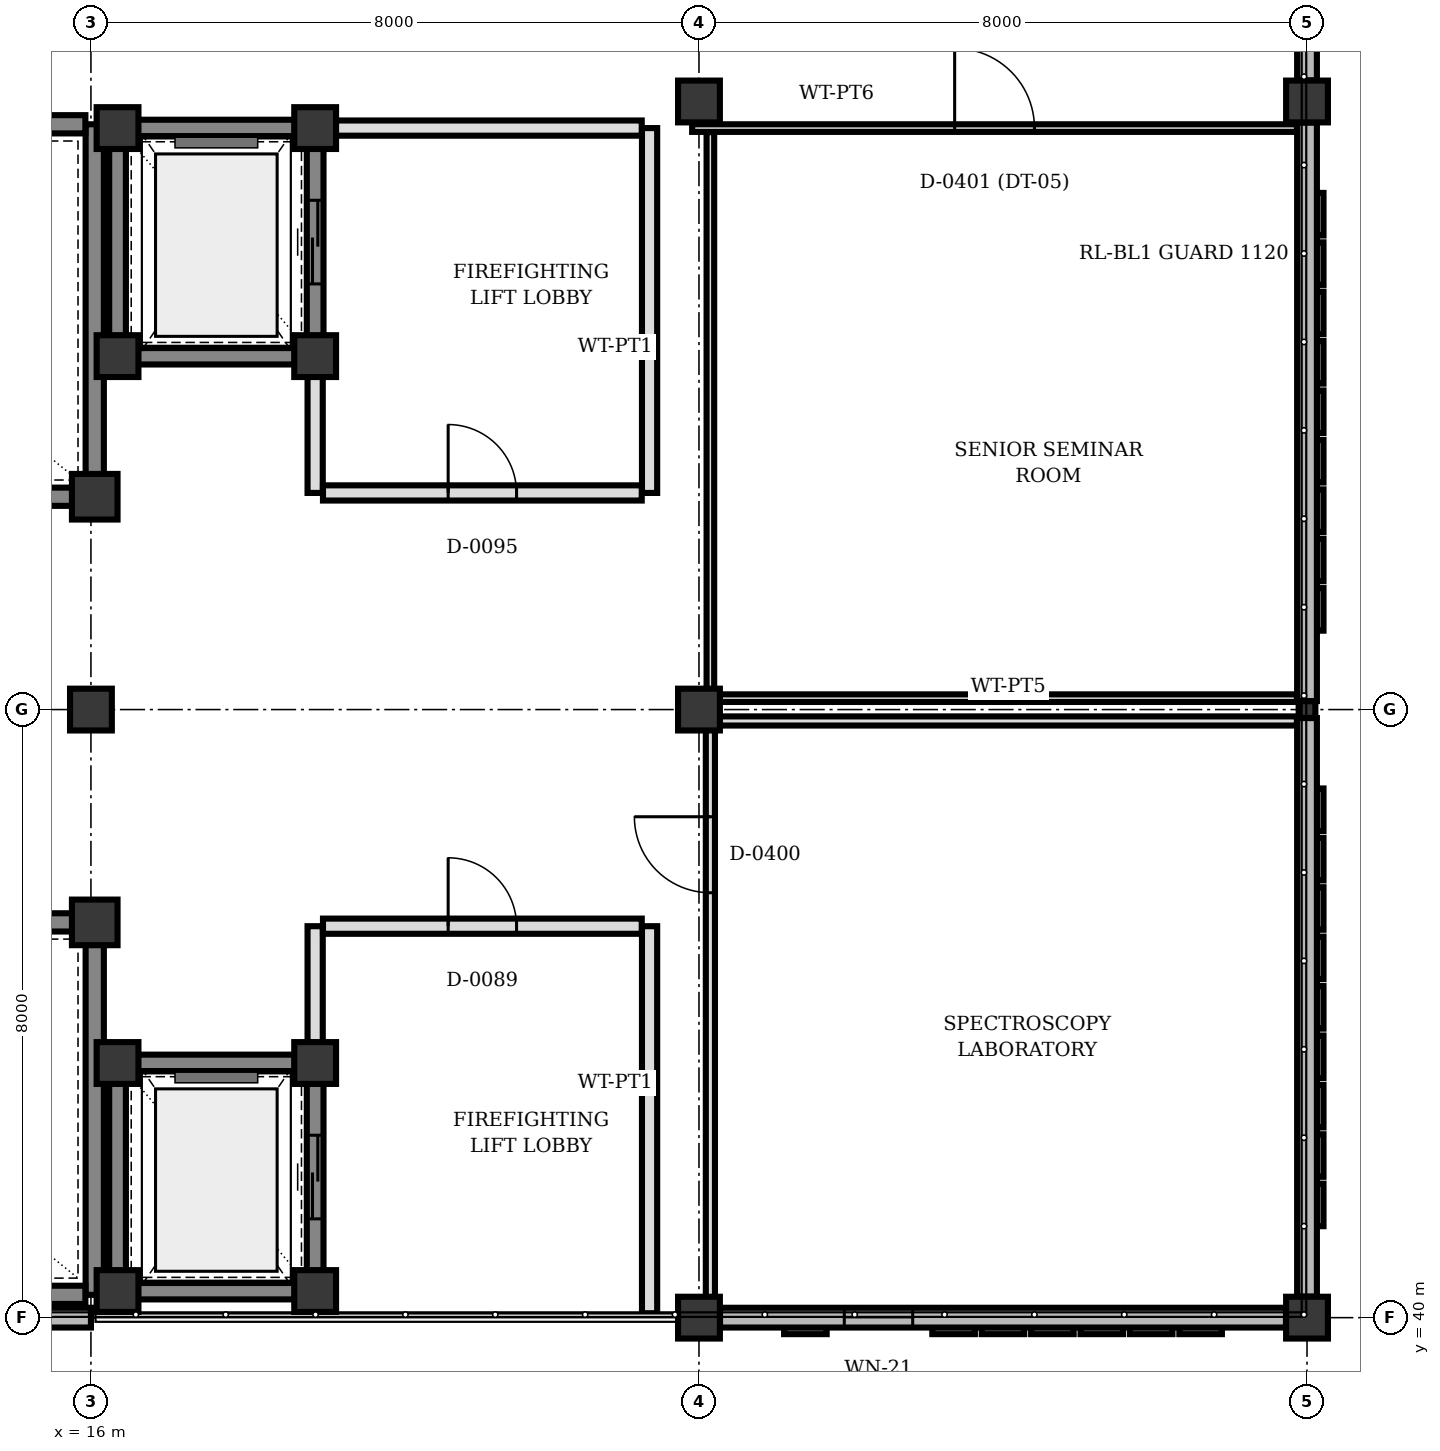
"""IFC4 building model, lengths in metres.
Left out: names, types, materials, properties, quantities, classifications, styles, units other than length and angle.
Written with IfcOpenShell. Run it as: python <this file> out.ifc"""

import sys

from ifc_helpers import new_model, si_unit, direction, frame, frame_2d, origin, origin_2d, place, context, subcontext, project, spatial, rectangle, hollow_rectangle, extrude, element, fill, save


model = new_model("IFC4")
c1 = context("Model", 3, precision=1e-05, world=origin(), true_north=direction((0.0, 1.0)))
c2 = subcontext(c1, "Body", "Model", "MODEL_VIEW")
j1 = project(units=[si_unit("LENGTHUNIT", "METRE"), si_unit("PLANEANGLEUNIT", "RADIAN")], contexts=[c1])
p1 = place(None, origin())
s1 = spatial("IfcSite", under=j1, at=p1, CompositionType="ELEMENT")
p2 = place(p1, origin())
s2 = spatial("IfcBuilding", under=s1, at=p2, CompositionType="ELEMENT")
p3 = place(p2, frame((0.0, 0.0, 16.5)))
s3 = spatial("IfcBuildingStorey", under=s2, at=p3, CompositionType="ELEMENT", Elevation=16.5)
for number, where, z_axis, x_axis in (
    (1, (16.05, 45.2, 0.0), (0.0, 0.0, 1.0), (1.0, 0.0, 0.0)),
    (2, (16.05, 50.8, 0.0), (0.0, 0.0, 1.0), (1.0, 0.0, 0.0)),
):
    element("IfcColumn", number, at=place(p3, frame(where, z_axis=z_axis, x_axis=x_axis)), inside=s3, PredefinedType="COLUMN", context=c2, shape_type="SweptSolid", body=[
        extrude(rectangle(XDim=0.6, YDim=0.6, at=origin_2d()), origin(), (0.0, 0.0, 1.0), 4.0),
    ])
for number, where, z_axis, x_axis in (
    (3, (16.35, 40.35, 0.0), (0.0, 0.0, 1.0), (1.0, 0.0, 0.0)),
    (4, (18.95, 40.35, 0.0), (0.0, 0.0, 1.0), (1.0, 0.0, 0.0)),
    (5, (18.95, 43.35, 0.0), (0.0, 0.0, 1.0), (1.0, 0.0, 0.0)),
    (6, (16.35, 43.35, 0.0), (0.0, 0.0, 1.0), (1.0, 0.0, 0.0)),
    (7, (16.35, 52.65, 0.0), (0.0, 0.0, 1.0), (1.0, 0.0, 0.0)),
    (8, (18.95, 52.65, 0.0), (0.0, 0.0, 1.0), (1.0, 0.0, 0.0)),
    (9, (18.95, 55.65, 0.0), (0.0, 0.0, 1.0), (1.0, 0.0, 0.0)),
    (10, (16.35, 55.65, 0.0), (0.0, 0.0, 1.0), (1.0, 0.0, 0.0)),
    (11, (16.0, 48.0, 0.0), (0.0, 0.0, 1.0), (1.0, 0.0, 0.0)),
    (12, (24.0, 40.0, 0.0), (0.0, 0.0, 1.0), (1.0, 0.0, 0.0)),
    (13, (24.0, 48.0, 0.0), (0.0, 0.0, 1.0), (1.0, 0.0, 0.0)),
    (14, (24.0, 56.0, 0.0), (0.0, 0.0, 1.0), (1.0, 0.0, 0.0)),
    (15, (32.0, 40.0, 0.0), (0.0, 0.0, 1.0), (1.0, 0.0, 0.0)),
):
    element("IfcColumn", number, at=place(p3, frame(where, z_axis=z_axis, x_axis=x_axis)), inside=s3, PredefinedType="COLUMN", context=c2, shape_type="SweptSolid", body=[
        extrude(rectangle(XDim=0.55, YDim=0.55, at=origin_2d()), origin(), (0.0, 0.0, 1.0), 4.0),
    ])
p4 = place(p3, frame((32.0, 48.0, 0.0), z_axis=(0.0, 0.0, 1.0), x_axis=(1.0, 0.0, 0.0)))
e16 = element("IfcColumn", 16, at=p4, inside=s3, PredefinedType="COLUMN", context=c2, shape_type="SweptSolid", body=[
    extrude(hollow_rectangle(XDim=0.22, YDim=0.22, WallThickness=0.01, at=origin_2d()), origin(), (0.0, 0.0, 1.0), 4.0),
])
p5 = place(p3, frame((32.0, 56.0, 0.0), z_axis=(0.0, 0.0, 1.0), x_axis=(1.0, 0.0, 0.0)))
e17 = element("IfcColumn", 17, at=p5, inside=s3, PredefinedType="COLUMN", context=c2, shape_type="SweptSolid", body=[
    extrude(rectangle(XDim=0.55, YDim=0.55, at=origin_2d()), origin(), (0.0, 0.0, 1.0), 4.0),
])
p6 = place(p3, frame((32.0, 61.888, 0.0), z_axis=(0.0, 0.0, 1.0), x_axis=(0.0, -1.0, 0.0)))
e18 = element("IfcWall", 18, at=p6, inside=s3, PredefinedType="SOLIDWALL", context=c2, shape_type="SweptSolid", body=[
    extrude(rectangle(XDim=5.611, YDim=0.26, at=frame_2d((2.805, 0.0))), origin(), (0.0, 0.0, 1.0), 3.068),
])
for number, where, z_axis, x_axis in (
    (19, (32.0, 55.723, 0.0), (0.0, 0.0, 1.0), (0.0, -1.0, 0.0)),
    (20, (32.0, 47.888, 0.0), (0.0, 0.0, 1.0), (0.0, -1.0, 0.0)),
):
    element("IfcWall", number, at=place(p3, frame(where, z_axis=z_axis, x_axis=x_axis)), inside=s3, PredefinedType="SOLIDWALL", context=c2, shape_type="SweptSolid", body=[
        extrude(rectangle(XDim=7.611, YDim=0.26, at=frame_2d((3.805, 0.0))), origin(), (0.0, 0.0, 1.0), 3.149),
    ])
p7 = place(p3, frame((31.723, 40.0, 0.0), z_axis=(0.0, 0.0, 1.0), x_axis=(-1.0, 0.0, 0.0)))
e21 = element("IfcWall", 21, at=p7, inside=s3, PredefinedType="SOLIDWALL", context=c2, shape_type="SweptSolid", body=[
    extrude(rectangle(XDim=7.446, YDim=0.26, at=frame_2d((3.723, 0.0))), origin(), (0.0, 0.0, 1.0), 3.068),
])
p8 = place(p7, frame((4.911, 0.0, 0.9)))
e22 = element("IfcOpeningElement", 22, at=p8, cuts=e21, PredefinedType="OPENING", context=c2, shape_type="SweptSolid", body=[
    extrude(rectangle(XDim=0.9, YDim=1.4, at=frame_2d((0.45, 0.7))), frame((0.0, 0.14, 0.0), z_axis=(0.0, -1.0, 0.0), x_axis=(1.0, 0.0, 0.0)), (0.0, 0.0, 1.0), 0.28),
])
p9 = place(p3, frame((16.0, 40.0, 0.0), z_axis=(0.0, 0.0, 1.0), x_axis=(-1.0, 0.0, 0.0)))
e23 = element("IfcWall", 23, at=p9, inside=s3, PredefinedType="SOLIDWALL", context=c2, shape_type="SweptSolid", body=[
    extrude(rectangle(XDim=7.448, YDim=0.26, at=frame_2d((3.724, 0.0))), origin(), (0.0, 0.0, 1.0), 3.55),
])
p10 = place(p3, frame((16.05, 44.908, 0.0), z_axis=(0.0, 0.0, 1.0), x_axis=(0.0, -1.0, 0.0)))
e24 = element("IfcWall", 24, at=p10, inside=s3, PredefinedType="SHEAR", context=c2, shape_type="SweptSolid", body=[
    extrude(rectangle(XDim=4.608, YDim=0.24, at=frame_2d((2.304, 0.0))), origin(), (0.0, 0.0, 1.0), 3.74),
])
p11 = place(p3, frame((15.927, 40.3, 0.0), z_axis=(0.0, 0.0, 1.0), x_axis=(-1.0, 0.0, 0.0)))
e25 = element("IfcWall", 25, at=p11, inside=s3, PredefinedType="SHEAR", context=c2, shape_type="SweptSolid", body=[
    extrude(rectangle(XDim=7.385, YDim=0.24, at=frame_2d((3.692, 0.0))), origin(), (0.0, 0.0, 1.0), 3.74),
])
p12 = place(p3, frame((15.758, 45.2, 0.0), z_axis=(0.0, 0.0, 1.0), x_axis=(-1.0, 0.0, 0.0)))
e26 = element("IfcWall", 26, at=p12, inside=s3, PredefinedType="SHEAR", context=c2, shape_type="SweptSolid", body=[
    extrude(rectangle(XDim=7.216, YDim=0.24, at=frame_2d((3.608, 0.0))), origin(), (0.0, 0.0, 1.0), 3.74),
])
p13 = place(p12, frame((5.694, 0.0, 0.0)))
e27 = element("IfcOpeningElement", 27, at=p13, cuts=e26, PredefinedType="OPENING", context=c2, shape_type="SweptSolid", body=[
    extrude(rectangle(XDim=0.88, YDim=2.1, at=frame_2d((0.44, 1.05))), frame((0.0, 0.13, 0.0), z_axis=(0.0, -1.0, 0.0), x_axis=(1.0, 0.0, 0.0)), (0.0, 0.0, 1.0), 0.26),
])
p14 = place(p3, frame((16.05, 55.7, 0.0), z_axis=(0.0, 0.0, 1.0), x_axis=(0.0, -1.0, 0.0)))
e28 = element("IfcWall", 28, at=p14, inside=s3, PredefinedType="SHEAR", context=c2, shape_type="SweptSolid", body=[
    extrude(rectangle(XDim=4.608, YDim=0.24, at=frame_2d((2.304, 0.0))), origin(), (0.0, 0.0, 1.0), 3.74),
])
p15 = place(p3, frame((15.758, 50.8, 0.0), z_axis=(0.0, 0.0, 1.0), x_axis=(-1.0, 0.0, 0.0)))
e29 = element("IfcWall", 29, at=p15, inside=s3, PredefinedType="SHEAR", context=c2, shape_type="SweptSolid", body=[
    extrude(rectangle(XDim=7.216, YDim=0.24, at=frame_2d((3.608, 0.0))), origin(), (0.0, 0.0, 1.0), 3.74),
])
p16 = place(p15, frame((5.694, 0.0, 0.0)))
e30 = element("IfcOpeningElement", 30, at=p16, cuts=e29, PredefinedType="OPENING", context=c2, shape_type="SweptSolid", body=[
    extrude(rectangle(XDim=0.88, YDim=2.1, at=frame_2d((0.44, 1.05))), frame((0.0, 0.13, 0.0), z_axis=(0.0, -1.0, 0.0), x_axis=(1.0, 0.0, 0.0)), (0.0, 0.0, 1.0), 0.26),
])
p17 = place(p3, frame((15.927, 55.7, 0.0), z_axis=(0.0, 0.0, 1.0), x_axis=(-1.0, 0.0, 0.0)))
e31 = element("IfcWall", 31, at=p17, inside=s3, PredefinedType="SHEAR", context=c2, shape_type="SweptSolid", body=[
    extrude(rectangle(XDim=7.385, YDim=0.24, at=frame_2d((3.692, 0.0))), origin(), (0.0, 0.0, 1.0), 3.74),
])
p18 = place(p3, frame((16.617, 40.35, 0.0), z_axis=(0.0, 0.0, 1.0), x_axis=(1.0, 0.0, 0.0)))
e32 = element("IfcWall", 32, at=p18, inside=s3, PredefinedType="SHEAR", context=c2, shape_type="SweptSolid", body=[
    extrude(rectangle(XDim=2.066, YDim=0.22, at=frame_2d((1.033, 0.0))), origin(), (0.0, 0.0, 1.0), 3.74),
])
p19 = place(p3, frame((18.95, 40.617, 0.0), z_axis=(0.0, 0.0, 1.0), x_axis=(0.0, 1.0, 0.0)))
e33 = element("IfcWall", 33, at=p19, inside=s3, PredefinedType="SHEAR", context=c2, shape_type="SweptSolid", body=[
    extrude(rectangle(XDim=2.466, YDim=0.22, at=frame_2d((1.233, 0.0))), origin(), (0.0, 0.0, 1.0), 3.74),
])
p20 = place(p19, frame((0.683, 0.0, 0.0)))
e34 = element("IfcOpeningElement", 34, at=p20, cuts=e33, PredefinedType="OPENING", context=c2, shape_type="SweptSolid", body=[
    extrude(rectangle(XDim=1.1, YDim=2.15, at=frame_2d((0.55, 1.075))), frame((0.0, 0.12, 0.0), z_axis=(0.0, -1.0, 0.0), x_axis=(1.0, 0.0, 0.0)), (0.0, 0.0, 1.0), 0.24),
])
p21 = place(p3, frame((18.683, 43.35, 0.0), z_axis=(0.0, 0.0, 1.0), x_axis=(-1.0, 0.0, 0.0)))
e35 = element("IfcWall", 35, at=p21, inside=s3, PredefinedType="SHEAR", context=c2, shape_type="SweptSolid", body=[
    extrude(rectangle(XDim=2.066, YDim=0.22, at=frame_2d((1.033, 0.0))), origin(), (0.0, 0.0, 1.0), 3.74),
])
p22 = place(p3, frame((16.35, 43.083, 0.0), z_axis=(0.0, 0.0, 1.0), x_axis=(0.0, -1.0, 0.0)))
e36 = element("IfcWall", 36, at=p22, inside=s3, PredefinedType="SHEAR", context=c2, shape_type="SweptSolid", body=[
    extrude(rectangle(XDim=2.466, YDim=0.22, at=frame_2d((1.233, 0.0))), origin(), (0.0, 0.0, 1.0), 3.74),
])
p23 = place(p3, frame((18.95, 43.617, 0.0), z_axis=(0.0, 0.0, 1.0), x_axis=(0.0, 1.0, 0.0)))
e37 = element("IfcWall", 37, at=p23, inside=s3, PredefinedType="PARTITIONING", context=c2, shape_type="SweptSolid", body=[
    extrude(rectangle(XDim=1.533, YDim=0.2, at=frame_2d((0.767, 0.0))), origin(), (0.0, 0.0, 1.0), 3.7),
])
p24 = place(p3, frame((23.35, 40.058, 0.0), z_axis=(0.0, 0.0, 1.0), x_axis=(0.0, 1.0, 0.0)))
e38 = element("IfcWall", 38, at=p24, inside=s3, PredefinedType="PARTITIONING", context=c2, shape_type="SweptSolid", body=[
    extrude(rectangle(XDim=5.092, YDim=0.2, at=frame_2d((2.546, 0.0))), origin(), (0.0, 0.0, 1.0), 3.7),
])
p25 = place(p3, frame((19.053, 45.15, 0.0), z_axis=(0.0, 0.0, 1.0), x_axis=(1.0, 0.0, 0.0)))
e39 = element("IfcWall", 39, at=p25, inside=s3, PredefinedType="PARTITIONING", context=c2, shape_type="SweptSolid", body=[
    extrude(rectangle(XDim=4.194, YDim=0.2, at=frame_2d((2.097, 0.0))), origin(), (0.0, 0.0, 1.0), 3.7),
])
p26 = place(p25, frame((1.647, 0.0, 0.0)))
e40 = element("IfcOpeningElement", 40, at=p26, cuts=e39, PredefinedType="OPENING", context=c2, shape_type="SweptSolid", body=[
    extrude(rectangle(XDim=0.9, YDim=2.2, at=frame_2d((0.45, 1.1))), frame((0.0, 0.11, 0.0), z_axis=(0.0, -1.0, 0.0), x_axis=(1.0, 0.0, 0.0)), (0.0, 0.0, 1.0), 0.22),
])
p27 = place(p3, frame((16.617, 52.65, 0.0), z_axis=(0.0, 0.0, 1.0), x_axis=(1.0, 0.0, 0.0)))
e41 = element("IfcWall", 41, at=p27, inside=s3, PredefinedType="SHEAR", context=c2, shape_type="SweptSolid", body=[
    extrude(rectangle(XDim=2.066, YDim=0.22, at=frame_2d((1.033, 0.0))), origin(), (0.0, 0.0, 1.0), 3.74),
])
p28 = place(p3, frame((18.95, 52.917, 0.0), z_axis=(0.0, 0.0, 1.0), x_axis=(0.0, 1.0, 0.0)))
e42 = element("IfcWall", 42, at=p28, inside=s3, PredefinedType="SHEAR", context=c2, shape_type="SweptSolid", body=[
    extrude(rectangle(XDim=2.466, YDim=0.22, at=frame_2d((1.233, 0.0))), origin(), (0.0, 0.0, 1.0), 3.74),
])
p29 = place(p28, frame((0.683, 0.0, 0.0)))
e43 = element("IfcOpeningElement", 43, at=p29, cuts=e42, PredefinedType="OPENING", context=c2, shape_type="SweptSolid", body=[
    extrude(rectangle(XDim=1.1, YDim=2.15, at=frame_2d((0.55, 1.075))), frame((0.0, 0.12, 0.0), z_axis=(0.0, -1.0, 0.0), x_axis=(1.0, 0.0, 0.0)), (0.0, 0.0, 1.0), 0.24),
])
p30 = place(p3, frame((18.683, 55.65, 0.0), z_axis=(0.0, 0.0, 1.0), x_axis=(-1.0, 0.0, 0.0)))
e44 = element("IfcWall", 44, at=p30, inside=s3, PredefinedType="SHEAR", context=c2, shape_type="SweptSolid", body=[
    extrude(rectangle(XDim=2.066, YDim=0.22, at=frame_2d((1.033, 0.0))), origin(), (0.0, 0.0, 1.0), 3.74),
])
p31 = place(p3, frame((16.35, 55.383, 0.0), z_axis=(0.0, 0.0, 1.0), x_axis=(0.0, -1.0, 0.0)))
e45 = element("IfcWall", 45, at=p31, inside=s3, PredefinedType="SHEAR", context=c2, shape_type="SweptSolid", body=[
    extrude(rectangle(XDim=2.466, YDim=0.22, at=frame_2d((1.233, 0.0))), origin(), (0.0, 0.0, 1.0), 3.74),
])
p32 = place(p3, frame((18.95, 50.85, 0.0), z_axis=(0.0, 0.0, 1.0), x_axis=(0.0, 1.0, 0.0)))
e46 = element("IfcWall", 46, at=p32, inside=s3, PredefinedType="PARTITIONING", context=c2, shape_type="SweptSolid", body=[
    extrude(rectangle(XDim=1.533, YDim=0.2, at=frame_2d((0.767, 0.0))), origin(), (0.0, 0.0, 1.0), 3.7),
])
p33 = place(p3, frame((23.35, 50.85, 0.0), z_axis=(0.0, 0.0, 1.0), x_axis=(0.0, 1.0, 0.0)))
e47 = element("IfcWall", 47, at=p33, inside=s3, PredefinedType="PARTITIONING", context=c2, shape_type="SweptSolid", body=[
    extrude(rectangle(XDim=4.8, YDim=0.2, at=frame_2d((2.4, 0.0))), origin(), (0.0, 0.0, 1.0), 3.7),
])
p34 = place(p3, frame((19.217, 55.65, 0.0), z_axis=(0.0, 0.0, 1.0), x_axis=(1.0, 0.0, 0.0)))
e48 = element("IfcWall", 48, at=p34, inside=s3, PredefinedType="PARTITIONING", context=c2, shape_type="SweptSolid", body=[
    extrude(rectangle(XDim=4.03, YDim=0.2, at=frame_2d((2.015, 0.0))), origin(), (0.0, 0.0, 1.0), 3.7),
])
p35 = place(p3, frame((19.053, 50.85, 0.0), z_axis=(0.0, 0.0, 1.0), x_axis=(1.0, 0.0, 0.0)))
e49 = element("IfcWall", 49, at=p35, inside=s3, PredefinedType="PARTITIONING", context=c2, shape_type="SweptSolid", body=[
    extrude(rectangle(XDim=4.194, YDim=0.2, at=frame_2d((2.097, 0.0))), origin(), (0.0, 0.0, 1.0), 3.7),
])
p36 = place(p35, frame((1.647, 0.0, 0.0)))
e50 = element("IfcOpeningElement", 50, at=p36, cuts=e49, PredefinedType="OPENING", context=c2, shape_type="SweptSolid", body=[
    extrude(rectangle(XDim=0.9, YDim=2.2, at=frame_2d((0.45, 1.1))), frame((0.0, 0.11, 0.0), z_axis=(0.0, -1.0, 0.0), x_axis=(1.0, 0.0, 0.0)), (0.0, 0.0, 1.0), 0.22),
])
p37 = place(p3, frame((24.267, 47.85, 0.0), z_axis=(0.0, 0.0, 1.0), x_axis=(1.0, 0.0, 0.0)))
e51 = element("IfcWall", 51, at=p37, inside=s3, PredefinedType="PARTITIONING", context=c2, shape_type="SweptSolid", body=[
    extrude(rectangle(XDim=7.6, YDim=0.12, at=frame_2d((3.8, 0.0))), origin(), (0.0, 0.0, 1.0), 3.149),
])
p38 = place(p3, frame((24.15, 40.267, 0.0), z_axis=(0.0, 0.0, 1.0), x_axis=(0.0, 1.0, 0.0)))
e52 = element("IfcWall", 52, at=p38, inside=s3, PredefinedType="PARTITIONING", context=c2, shape_type="SweptSolid", body=[
    extrude(rectangle(XDim=7.466, YDim=0.12, at=frame_2d((3.733, 0.0))), origin(), (0.0, 0.0, 1.0), 3.068),
])
p39 = place(p38, frame((5.323, 0.0, 0.0)))
e53 = element("IfcOpeningElement", 53, at=p39, cuts=e52, PredefinedType="OPENING", context=c2, shape_type="SweptSolid", body=[
    extrude(rectangle(XDim=1.0, YDim=2.1, at=frame_2d((0.5, 1.05))), frame((0.0, 0.07, 0.0), z_axis=(0.0, -1.0, 0.0), x_axis=(1.0, 0.0, 0.0)), (0.0, 0.0, 1.0), 0.14),
])
p40 = place(p3, frame((23.91, 55.65, 0.0), z_axis=(0.0, 0.0, 1.0), x_axis=(1.0, 0.0, 0.0)))
e54 = element("IfcWall", 54, at=p40, inside=s3, PredefinedType="PARTITIONING", context=c2, shape_type="SweptSolid", body=[
    extrude(rectangle(XDim=7.957, YDim=0.1, at=frame_2d((3.979, 0.0))), origin(), (0.0, 0.0, 1.0), 3.223),
])
p41 = place(p40, frame((3.454, 0.0, 0.0)))
e55 = element("IfcOpeningElement", 55, at=p41, cuts=e54, PredefinedType="OPENING", context=c2, shape_type="SweptSolid", body=[
    extrude(rectangle(XDim=1.05, YDim=2.1, at=frame_2d((0.525, 1.05))), frame((0.0, 0.06, 0.0), z_axis=(0.0, -1.0, 0.0), x_axis=(1.0, 0.0, 0.0)), (0.0, 0.0, 1.0), 0.12),
])
p42 = place(p3, frame((31.867, 48.15, 0.0), z_axis=(0.0, 0.0, 1.0), x_axis=(-1.0, 0.0, 0.0)))
e56 = element("IfcWall", 56, at=p42, inside=s3, PredefinedType="PARTITIONING", context=c2, shape_type="SweptSolid", body=[
    extrude(rectangle(XDim=7.6, YDim=0.1, at=frame_2d((3.8, 0.0))), origin(), (0.0, 0.0, 1.0), 3.149),
])
p43 = place(p3, frame((24.15, 48.267, 0.0), z_axis=(0.0, 0.0, 1.0), x_axis=(0.0, 1.0, 0.0)))
e57 = element("IfcWall", 57, at=p43, inside=s3, PredefinedType="PARTITIONING", context=c2, shape_type="SweptSolid", body=[
    extrude(rectangle(XDim=7.33, YDim=0.1, at=frame_2d((3.665, 0.0))), origin(), (0.0, 0.0, 1.0), 3.223),
])
p44 = place(p8, origin())
e58 = element("IfcWindow", 58, at=p44, inside=s3, PartitioningType="SINGLE_PANEL", PredefinedType="WINDOW", context=c2, shape_type="SweptSolid", body=[
    extrude(rectangle(XDim=0.9, YDim=1.4, at=frame_2d((0.45, 0.7))), frame((0.0, 0.03, 0.0), z_axis=(0.0, -1.0, 0.0), x_axis=(1.0, 0.0, 0.0)), (0.0, 0.0, 1.0), 0.06),
])
fill(e22, e58)
p45 = place(p20, origin())
e59 = element("IfcDoor", 59, at=p45, inside=s3, OperationType="DOUBLE_DOOR_SLIDING", PredefinedType="DOOR", context=c2, shape_type="SweptSolid", body=[
    extrude(rectangle(XDim=1.1, YDim=2.15, at=frame_2d((0.55, 1.075))), frame((0.0, 0.025, 0.0), z_axis=(0.0, -1.0, 0.0), x_axis=(1.0, 0.0, 0.0)), (0.0, 0.0, 1.0), 0.05),
])
fill(e34, e59)
p46 = place(p26, origin())
e60 = element("IfcDoor", 60, at=p46, inside=s3, OperationType="SINGLE_SWING_LEFT", PredefinedType="DOOR", context=c2, shape_type="SweptSolid", body=[
    extrude(rectangle(XDim=0.9, YDim=2.2, at=frame_2d((0.45, 1.1))), frame((0.0, 0.025, 0.0), z_axis=(0.0, -1.0, 0.0), x_axis=(1.0, 0.0, 0.0)), (0.0, 0.0, 1.0), 0.05),
])
fill(e40, e60)
p47 = place(p29, origin())
e61 = element("IfcDoor", 61, at=p47, inside=s3, OperationType="DOUBLE_DOOR_SLIDING", PredefinedType="DOOR", context=c2, shape_type="SweptSolid", body=[
    extrude(rectangle(XDim=1.1, YDim=2.15, at=frame_2d((0.55, 1.075))), frame((0.0, 0.025, 0.0), z_axis=(0.0, -1.0, 0.0), x_axis=(1.0, 0.0, 0.0)), (0.0, 0.0, 1.0), 0.05),
])
fill(e43, e61)
p48 = place(p36, origin())
e62 = element("IfcDoor", 62, at=p48, inside=s3, OperationType="SINGLE_SWING_LEFT", PredefinedType="DOOR", context=c2, shape_type="SweptSolid", body=[
    extrude(rectangle(XDim=0.9, YDim=2.2, at=frame_2d((0.45, 1.1))), frame((0.0, 0.025, 0.0), z_axis=(0.0, -1.0, 0.0), x_axis=(1.0, 0.0, 0.0)), (0.0, 0.0, 1.0), 0.05),
])
fill(e50, e62)
p49 = place(p39, origin())
e63 = element("IfcDoor", 63, at=p49, inside=s3, OperationType="SINGLE_SWING_RIGHT", PredefinedType="DOOR", context=c2, shape_type="SweptSolid", body=[
    extrude(rectangle(XDim=1.0, YDim=2.1, at=frame_2d((0.5, 1.05))), frame((0.0, 0.025, 0.0), z_axis=(0.0, -1.0, 0.0), x_axis=(1.0, 0.0, 0.0)), (0.0, 0.0, 1.0), 0.05),
])
fill(e53, e63)
p50 = place(p41, origin())
e64 = element("IfcDoor", 64, at=p50, inside=s3, OperationType="SINGLE_SWING_LEFT", PredefinedType="DOOR", context=c2, shape_type="SweptSolid", body=[
    extrude(rectangle(XDim=1.05, YDim=2.1, at=frame_2d((0.525, 1.05))), frame((0.0, 0.025, 0.0), z_axis=(0.0, -1.0, 0.0), x_axis=(1.0, 0.0, 0.0)), (0.0, 0.0, 1.0), 0.05),
])
fill(e55, e64)
save(model, sys.argv[1])
